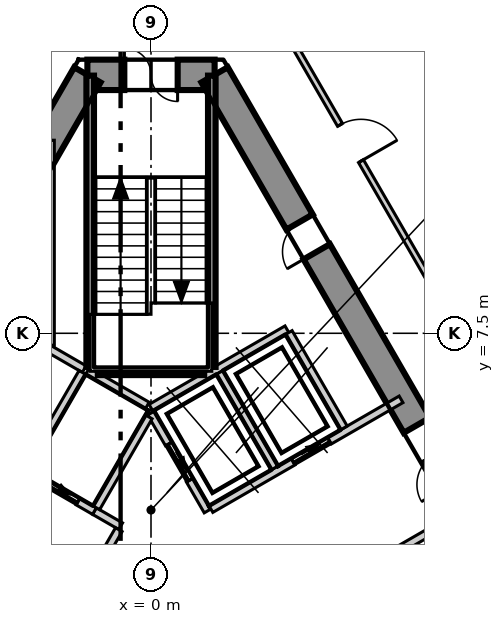
"""IFC4 building model, lengths in metres.
Left out: names, types, materials, properties, quantities, classifications, styles, units other than length and angle.
Written with IfcOpenShell. Run it as: python <this file> out.ifc"""

import sys

from ifc_helpers import new_model, si_unit, direction, frame, frame_2d, origin, place, context, subcontext, project, spatial, polyline, rectangle, outline, extrude, element, fill, save


model = new_model("IFC4")
c1 = context("Model", 3, precision=1e-05, world=origin(), true_north=direction((0.0, 1.0)))
c2 = subcontext(c1, "Body", "Model", "MODEL_VIEW")
j1 = project(units=[si_unit("LENGTHUNIT", "METRE"), si_unit("PLANEANGLEUNIT", "RADIAN")], contexts=[c1])
p1 = place(None, origin())
s1 = spatial("IfcSite", under=j1, at=p1, CompositionType="ELEMENT")
p2 = place(p1, origin())
s2 = spatial("IfcBuilding", under=s1, at=p2, CompositionType="ELEMENT")
p3 = place(p2, frame((0.0, 0.0, 128.3)))
s3 = spatial("IfcBuildingStorey", under=s2, at=p3, CompositionType="ELEMENT", Elevation=128.3)
p4 = place(p3, frame((1.674, 14.3, -0.3), z_axis=(0.0, 0.0, 1.0), x_axis=(-1.0, 0.0, 0.0)))
e1 = element("IfcWall", 1, at=p4, inside=s3, PredefinedType="SHEAR", context=c2, shape_type="SweptSolid", body=[
    extrude(outline(polyline([(-0.231, -0.4), (1.674, -0.4), (3.579, -0.4), (3.117, 0.4), (1.674, 0.4), (0.231, 0.4), (-0.231, -0.4)])), origin(), (0.0, 0.0, 1.0), 4.0),
])
p5 = place(p4, frame((0.974, 0.0, 0.3)))
e2 = element("IfcOpeningElement", 2, at=p5, cuts=e1, PredefinedType="OPENING", context=c2, shape_type="SweptSolid", body=[
    extrude(rectangle(XDim=1.4, YDim=2.1, at=frame_2d((0.7, 1.05))), frame((0.0, 0.41, 0.0), z_axis=(0.0, -1.0, 0.0), x_axis=(1.0, 0.0, 0.0)), (0.0, 0.0, 1.0), 0.82),
])
p6 = place(p3, frame((-1.674, 14.3, -0.3), z_axis=(0.0, 0.0, 1.0), x_axis=(-0.499995765644, -0.866027848477, 0.0)))
e3 = element("IfcWall", 3, at=p6, inside=s3, PredefinedType="SHEAR", context=c2, shape_type="SweptSolid", body=[
    extrude(outline(polyline([(-0.231, -0.4), (1.732, -0.4), (3.695, -0.4), (5.658, -0.4), (7.621, -0.4), (9.584, -0.4), (11.547, -0.4), (13.51, -0.4), (15.473, -0.4), (17.436, -0.4), (19.399, -0.4), (21.362, -0.4), (23.325, -0.4), (22.863, 0.4), (20.977, 0.4), (19.091, 0.4), (17.205, 0.4), (15.319, 0.4), (13.433, 0.4), (11.547, 0.4), (9.661, 0.4), (7.775, 0.4), (5.889, 0.4), (4.003, 0.4), (2.117, 0.4), (0.231, 0.4), (-0.231, -0.4)])), origin(), (0.0, 0.0, 1.0), 4.0),
])
p7 = place(p6, frame((10.997, 0.0, 0.3)))
e4 = element("IfcOpeningElement", 4, at=p7, cuts=e3, PredefinedType="OPENING", context=c2, shape_type="SweptSolid", body=[
    extrude(rectangle(XDim=1.1, YDim=2.1, at=frame_2d((0.55, 1.05))), frame((0.0, 0.41, 0.0), z_axis=(0.0, -1.0, 0.0), x_axis=(1.0, 0.0, 0.0)), (0.0, 0.0, 1.0), 0.82),
])
p8 = place(p6, frame((5.444, 0.0, 0.3)))
e5 = element("IfcOpeningElement", 5, at=p8, cuts=e3, PredefinedType="OPENING", context=c2, shape_type="SweptSolid", body=[
    extrude(rectangle(XDim=0.9, YDim=2.1, at=frame_2d((0.45, 1.05))), frame((0.0, 0.41, 0.0), z_axis=(0.0, -1.0, 0.0), x_axis=(1.0, 0.0, 0.0)), (0.0, 0.0, 1.0), 0.82),
])
p9 = place(p3, frame((13.221, -5.7, -0.3), z_axis=(0.0, 0.0, 1.0), x_axis=(-0.499995765644, 0.866027848477, 0.0)))
e6 = element("IfcWall", 6, at=p9, inside=s3, PredefinedType="SHEAR", context=c2, shape_type="SweptSolid", body=[
    extrude(outline(polyline([(-0.231, -0.4), (1.732, -0.4), (3.695, -0.4), (5.658, -0.4), (7.621, -0.4), (9.584, -0.4), (11.547, -0.4), (13.51, -0.4), (15.473, -0.4), (17.436, -0.4), (19.399, -0.4), (21.362, -0.4), (23.325, -0.4), (22.863, 0.4), (20.977, 0.4), (19.091, 0.4), (17.205, 0.4), (15.319, 0.4), (13.433, 0.4), (11.547, 0.4), (9.661, 0.4), (7.775, 0.4), (5.889, 0.4), (4.003, 0.4), (2.117, 0.4), (0.231, 0.4), (-0.231, -0.4)])), origin(), (0.0, 0.0, 1.0), 4.0),
])
p10 = place(p9, frame((10.647, 0.0, 0.3)))
e7 = element("IfcOpeningElement", 7, at=p10, cuts=e6, PredefinedType="OPENING", context=c2, shape_type="SweptSolid", body=[
    extrude(rectangle(XDim=1.8, YDim=2.1, at=frame_2d((0.9, 1.05))), frame((0.0, 0.41, 0.0), z_axis=(0.0, -1.0, 0.0), x_axis=(1.0, 0.0, 0.0)), (0.0, 0.0, 1.0), 0.82),
])
p11 = place(p9, frame((17.721, 0.0, 0.3)))
e8 = element("IfcOpeningElement", 8, at=p11, cuts=e6, PredefinedType="OPENING", context=c2, shape_type="SweptSolid", body=[
    extrude(rectangle(XDim=0.9, YDim=2.1, at=frame_2d((0.45, 1.05))), frame((0.0, 0.41, 0.0), z_axis=(0.0, -1.0, 0.0), x_axis=(1.0, 0.0, 0.0)), (0.0, 0.0, 1.0), 0.82),
])
p12 = place(p3, frame((31.588, -14.647, 0.0), z_axis=(0.0, 0.0, 1.0), x_axis=(-0.500005036527, 0.866022495925, 0.0)))
e9 = element("IfcWall", 9, at=p12, inside=s3, PredefinedType="ELEMENTEDWALL", context=c2, shape_type="SweptSolid", body=[
    extrude(rectangle(XDim=56.938, YDim=0.2, at=frame_2d((28.469, 0.0))), origin(), (0.0, 0.0, 1.0), 3.7),
])
p13 = place(p12, frame((2.25, 0.0, 0.9)))
e10 = element("IfcOpeningElement", 10, at=p13, cuts=e9, PredefinedType="OPENING", context=c2, shape_type="SweptSolid", body=[
    extrude(rectangle(XDim=4.9, YDim=2.5, at=frame_2d((2.45, 1.25))), frame((0.0, 0.11, 0.0), z_axis=(0.0, -1.0, 0.0), x_axis=(1.0, 0.0, 0.0)), (0.0, 0.0, 1.0), 0.22),
])
p14 = place(p12, frame((9.044, 0.0, 0.9)))
e11 = element("IfcOpeningElement", 11, at=p14, cuts=e9, PredefinedType="OPENING", context=c2, shape_type="SweptSolid", body=[
    extrude(rectangle(XDim=4.9, YDim=2.5, at=frame_2d((2.45, 1.25))), frame((0.0, 0.11, 0.0), z_axis=(0.0, -1.0, 0.0), x_axis=(1.0, 0.0, 0.0)), (0.0, 0.0, 1.0), 0.22),
])
p15 = place(p12, frame((15.838, 0.0, 0.9)))
e12 = element("IfcOpeningElement", 12, at=p15, cuts=e9, PredefinedType="OPENING", context=c2, shape_type="SweptSolid", body=[
    extrude(rectangle(XDim=4.9, YDim=2.5, at=frame_2d((2.45, 1.25))), frame((0.0, 0.11, 0.0), z_axis=(0.0, -1.0, 0.0), x_axis=(1.0, 0.0, 0.0)), (0.0, 0.0, 1.0), 0.22),
])
p16 = place(p12, frame((22.632, 0.0, 0.9)))
e13 = element("IfcOpeningElement", 13, at=p16, cuts=e9, PredefinedType="OPENING", context=c2, shape_type="SweptSolid", body=[
    extrude(rectangle(XDim=4.9, YDim=2.5, at=frame_2d((2.45, 1.25))), frame((0.0, 0.11, 0.0), z_axis=(0.0, -1.0, 0.0), x_axis=(1.0, 0.0, 0.0)), (0.0, 0.0, 1.0), 0.22),
])
p17 = place(p12, frame((29.426, 0.0, 0.9)))
e14 = element("IfcOpeningElement", 14, at=p17, cuts=e9, PredefinedType="OPENING", context=c2, shape_type="SweptSolid", body=[
    extrude(rectangle(XDim=4.9, YDim=2.5, at=frame_2d((2.45, 1.25))), frame((0.0, 0.11, 0.0), z_axis=(0.0, -1.0, 0.0), x_axis=(1.0, 0.0, 0.0)), (0.0, 0.0, 1.0), 0.22),
])
p18 = place(p12, frame((36.22, 0.0, 0.9)))
e15 = element("IfcOpeningElement", 15, at=p18, cuts=e9, PredefinedType="OPENING", context=c2, shape_type="SweptSolid", body=[
    extrude(rectangle(XDim=4.9, YDim=2.5, at=frame_2d((2.45, 1.25))), frame((0.0, 0.11, 0.0), z_axis=(0.0, -1.0, 0.0), x_axis=(1.0, 0.0, 0.0)), (0.0, 0.0, 1.0), 0.22),
])
p19 = place(p12, frame((43.014, 0.0, 0.9)))
e16 = element("IfcOpeningElement", 16, at=p19, cuts=e9, PredefinedType="OPENING", context=c2, shape_type="SweptSolid", body=[
    extrude(rectangle(XDim=4.9, YDim=2.5, at=frame_2d((2.45, 1.25))), frame((0.0, 0.11, 0.0), z_axis=(0.0, -1.0, 0.0), x_axis=(1.0, 0.0, 0.0)), (0.0, 0.0, 1.0), 0.22),
])
p20 = place(p12, frame((49.808, 0.0, 0.9)))
e17 = element("IfcOpeningElement", 17, at=p20, cuts=e9, PredefinedType="OPENING", context=c2, shape_type="SweptSolid", body=[
    extrude(rectangle(XDim=4.9, YDim=2.5, at=frame_2d((2.45, 1.25))), frame((0.0, 0.11, 0.0), z_axis=(0.0, -1.0, 0.0), x_axis=(1.0, 0.0, 0.0)), (0.0, 0.0, 1.0), 0.22),
])
p21 = place(p3, frame((-8.903, 6.18, 0.0), z_axis=(0.0, 0.0, 1.0), x_axis=(0.500010074151, 0.866019587393, 0.0)))
e18 = element("IfcWall", 18, at=p21, inside=s3, PredefinedType="PARTITIONING", context=c2, shape_type="SweptSolid", body=[
    extrude(rectangle(XDim=17.806, YDim=0.15, at=frame_2d((8.903, 0.0))), origin(), (0.0, 0.0, 1.0), 3.7),
])
p22 = place(p21, frame((14.756, 0.0, 0.0)))
e19 = element("IfcOpeningElement", 19, at=p22, cuts=e18, PredefinedType="OPENING", context=c2, shape_type="SweptSolid", body=[
    extrude(rectangle(XDim=1.0, YDim=2.1, at=frame_2d((0.5, 1.05))), frame((0.0, 0.085, 0.0), z_axis=(0.0, -1.0, 0.0), x_axis=(1.0, 0.0, 0.0)), (0.0, 0.0, 1.0), 0.17),
])
p23 = place(p21, frame((2.838, 0.0, 0.0)))
e20 = element("IfcOpeningElement", 20, at=p23, cuts=e18, PredefinedType="OPENING", context=c2, shape_type="SweptSolid", body=[
    extrude(rectangle(XDim=1.1, YDim=2.1, at=frame_2d((0.55, 1.05))), frame((0.0, 0.085, 0.0), z_axis=(0.0, -1.0, 0.0), x_axis=(1.0, 0.0, 0.0)), (0.0, 0.0, 1.0), 0.17),
])
p24 = place(p21, frame((10.438, 0.0, 0.0)))
e21 = element("IfcOpeningElement", 21, at=p24, cuts=e18, PredefinedType="OPENING", context=c2, shape_type="SweptSolid", body=[
    extrude(rectangle(XDim=0.9, YDim=2.1, at=frame_2d((0.45, 1.05))), frame((0.0, 0.085, 0.0), z_axis=(0.0, -1.0, 0.0), x_axis=(1.0, 0.0, 0.0)), (0.0, 0.0, 1.0), 0.17),
])
p25 = place(p21, frame((7.438, 0.0, 0.0)))
e22 = element("IfcOpeningElement", 22, at=p25, cuts=e18, PredefinedType="OPENING", context=c2, shape_type="SweptSolid", body=[
    extrude(rectangle(XDim=0.9, YDim=2.1, at=frame_2d((0.45, 1.05))), frame((0.0, 0.085, 0.0), z_axis=(0.0, -1.0, 0.0), x_axis=(1.0, 0.0, 0.0)), (0.0, 0.0, 1.0), 0.17),
])
p26 = place(p3, frame((0.076, 21.468, 0.0), z_axis=(0.0, 0.0, 1.0), x_axis=(0.50001203818, -0.866018453426, 0.0)))
e23 = element("IfcWall", 23, at=p26, inside=s3, PredefinedType="PARTITIONING", context=c2, shape_type="SweptSolid", body=[
    extrude(rectangle(XDim=24.448, YDim=0.15, at=frame_2d((12.224, 0.0))), origin(), (0.0, 0.0, 1.0), 3.7),
])
p27 = place(p26, frame((9.798, 0.0, 0.0)))
e24 = element("IfcOpeningElement", 24, at=p27, cuts=e23, PredefinedType="OPENING", context=c2, shape_type="SweptSolid", body=[
    extrude(rectangle(XDim=1.1, YDim=2.1, at=frame_2d((0.55, 1.05))), frame((0.0, 0.085, 0.0), z_axis=(0.0, -1.0, 0.0), x_axis=(1.0, 0.0, 0.0)), (0.0, 0.0, 1.0), 0.17),
])
p28 = place(p26, frame((19.198, 0.0, 0.0)))
e25 = element("IfcOpeningElement", 25, at=p28, cuts=e23, PredefinedType="OPENING", context=c2, shape_type="SweptSolid", body=[
    extrude(rectangle(XDim=0.9, YDim=2.1, at=frame_2d((0.45, 1.05))), frame((0.0, 0.085, 0.0), z_axis=(0.0, -1.0, 0.0), x_axis=(1.0, 0.0, 0.0)), (0.0, 0.0, 1.0), 0.17),
])
p29 = place(p26, frame((16.398, 0.0, 0.0)))
e26 = element("IfcOpeningElement", 26, at=p29, cuts=e23, PredefinedType="OPENING", context=c2, shape_type="SweptSolid", body=[
    extrude(rectangle(XDim=1.0, YDim=2.1, at=frame_2d((0.5, 1.05))), frame((0.0, 0.085, 0.0), z_axis=(0.0, -1.0, 0.0), x_axis=(1.0, 0.0, 0.0)), (0.0, 0.0, 1.0), 0.17),
])
p30 = place(p26, frame((1.815, 0.0, 0.0)))
e27 = element("IfcOpeningElement", 27, at=p30, cuts=e23, PredefinedType="OPENING", context=c2, shape_type="SweptSolid", body=[
    extrude(rectangle(XDim=1.1, YDim=2.1, at=frame_2d((0.55, 1.05))), frame((0.0, 0.085, 0.0), z_axis=(0.0, -1.0, 0.0), x_axis=(1.0, 0.0, 0.0)), (0.0, 0.0, 1.0), 0.17),
])
p31 = place(p3, frame((-0.002, 5.542, 0.0), z_axis=(0.0, 0.0, 1.0), x_axis=(0.866103910842, 0.499863997127, 0.0)))
e28 = element("IfcWall", 28, at=p31, inside=s3, PredefinedType="SOLIDWALL", context=c2, shape_type="SweptSolid", body=[
    extrude(rectangle(XDim=4.131, YDim=0.2, at=frame_2d((2.065, 0.0))), origin(), (0.0, 0.0, 1.0), 3.7),
])
p32 = place(p3, frame((0.0, 5.4, 0.0), z_axis=(0.0, 0.0, 1.0), x_axis=(0.500103862429, -0.865965430478, 0.0)))
e29 = element("IfcWall", 29, at=p32, inside=s3, PredefinedType="SOLIDWALL", context=c2, shape_type="SweptSolid", body=[
    extrude(rectangle(XDim=2.973, YDim=0.2, at=frame_2d((1.487, 0.0))), origin(), (0.0, 0.0, 1.0), 3.7),
])
p33 = place(p32, frame((0.937, 0.0, 0.0)))
e30 = element("IfcOpeningElement", 30, at=p33, cuts=e29, PredefinedType="OPENING", context=c2, shape_type="SweptSolid", body=[
    extrude(rectangle(XDim=1.1, YDim=2.1, at=frame_2d((0.55, 1.05))), frame((0.0, 0.11, 0.0), z_axis=(0.0, -1.0, 0.0), x_axis=(1.0, 0.0, 0.0)), (0.0, 0.0, 1.0), 0.22),
])
p34 = place(p3, frame((1.577, 2.874, 0.0), z_axis=(0.0, 0.0, 1.0), x_axis=(0.866073694534, 0.499916348638, 0.0)))
e31 = element("IfcWall", 31, at=p34, inside=s3, PredefinedType="SOLIDWALL", context=c2, shape_type="SweptSolid", body=[
    extrude(rectangle(XDim=5.777, YDim=0.2, at=frame_2d((2.888, 0.0))), origin(), (0.0, 0.0, 1.0), 3.7),
])
p35 = place(p34, frame((2.497, 0.0, 0.0)))
e32 = element("IfcOpeningElement", 32, at=p35, cuts=e31, PredefinedType="OPENING", context=c2, shape_type="SweptSolid", body=[
    extrude(rectangle(XDim=1.1, YDim=2.1, at=frame_2d((0.55, 1.05))), frame((0.0, 0.11, 0.0), z_axis=(0.0, -1.0, 0.0), x_axis=(1.0, 0.0, 0.0)), (0.0, 0.0, 1.0), 0.22),
])
for number, where, z_axis, x_axis in (
    (33, (3.626, 7.52, 0.0), (0.0, 0.0, 1.0), (0.5, -0.866, 0.0)),
    (34, (1.807, 6.47, 0.0), (0.0, 0.0, 1.0), (0.5, -0.866, 0.0)),
):
    element("IfcWall", number, at=place(p3, frame(where, z_axis=z_axis, x_axis=x_axis)), inside=s3, PredefinedType="SOLIDWALL", context=c2, shape_type="SweptSolid", body=[
        extrude(rectangle(XDim=2.9, YDim=0.2, at=frame_2d((1.45, 0.0))), origin(), (0.0, 0.0, 1.0), 3.7),
    ])
p36 = place(p3, frame((3.278, -0.071, 0.0), z_axis=(0.0, 0.0, 1.0), x_axis=(0.865929348003, 0.5001663366, 0.0)))
e35 = element("IfcWall", 35, at=p36, inside=s3, PredefinedType="SOLIDWALL", context=c2, shape_type="SweptSolid", body=[
    extrude(rectangle(XDim=5.776, YDim=0.2, at=frame_2d((2.888, 0.0))), origin(), (0.0, 0.0, 1.0), 3.7),
])
p37 = place(p3, frame((-1.488, 2.822, 0.0), z_axis=(0.0, 0.0, 1.0), x_axis=(0.866236612152, -0.499633997809, 0.0)))
e36 = element("IfcWall", 36, at=p37, inside=s3, PredefinedType="SOLIDWALL", context=c2, shape_type="SweptSolid", body=[
    extrude(rectangle(XDim=0.796, YDim=0.2, at=frame_2d((0.398, 0.0))), origin(), (0.0, 0.0, 1.0), 3.7),
])
p38 = place(p3, frame((-3.489, 7.557, 0.0), z_axis=(0.0, 0.0, 1.0), x_axis=(0.866010750942, -0.50002537861, 0.0)))
e37 = element("IfcWall", 37, at=p38, inside=s3, PredefinedType="SOLIDWALL", context=c2, shape_type="SweptSolid", body=[
    extrude(rectangle(XDim=2.0, YDim=0.2, at=frame_2d((1.0, 0.0))), origin(), (0.0, 0.0, 1.0), 3.7),
])
p39 = place(p3, frame((-2.444, -0.433, 0.0), z_axis=(0.0, 0.0, 1.0), x_axis=(0.500035624827, 0.866004834804, 0.0)))
e38 = element("IfcWall", 38, at=p39, inside=s3, PredefinedType="SOLIDWALL", context=c2, shape_type="SweptSolid", body=[
    extrude(rectangle(XDim=3.194, YDim=0.2, at=frame_2d((1.597, 0.0))), origin(), (0.0, 0.0, 1.0), 3.7),
])
p40 = place(p3, frame((-3.309, 3.873, 0.0), z_axis=(0.0, 0.0, 1.0), x_axis=(0.866098583652, -0.499873227325, 0.0)))
e39 = element("IfcWall", 39, at=p40, inside=s3, PredefinedType="SOLIDWALL", context=c2, shape_type="SweptSolid", body=[
    extrude(rectangle(XDim=2.103, YDim=0.2, at=frame_2d((1.051, 0.0))), origin(), (0.0, 0.0, 1.0), 3.7),
])
p41 = place(p40, frame((0.502, 0.0, 0.0)))
e40 = element("IfcOpeningElement", 40, at=p41, cuts=e39, PredefinedType="OPENING", context=c2, shape_type="SweptSolid", body=[
    extrude(rectangle(XDim=1.1, YDim=2.1, at=frame_2d((0.55, 1.05))), frame((0.0, 0.11, 0.0), z_axis=(0.0, -1.0, 0.0), x_axis=(1.0, 0.0, 0.0)), (0.0, 0.0, 1.0), 0.22),
])
p42 = place(p3, frame((-3.257, 3.959, 0.0), z_axis=(0.0, 0.0, 1.0), x_axis=(0.50012328804, 0.865954211699, 0.0)))
e41 = element("IfcWall", 41, at=p42, inside=s3, PredefinedType="SOLIDWALL", context=c2, shape_type="SweptSolid", body=[
    extrude(rectangle(XDim=2.9, YDim=0.2, at=frame_2d((1.45, 0.0))), origin(), (0.0, 0.0, 1.0), 3.7),
])
p43 = place(p3, frame((-1.67, 6.507, 0.0), z_axis=(0.0, 0.0, 1.0), x_axis=(0.865941441609, -0.500145398563, 0.0)))
e42 = element("IfcWall", 42, at=p43, inside=s3, PredefinedType="SOLIDWALL", context=c2, shape_type="SweptSolid", body=[
    extrude(rectangle(XDim=1.815, YDim=0.2, at=frame_2d((0.908, 0.0))), origin(), (0.0, 0.0, 1.0), 3.7),
])
p44 = place(p3, frame((-1.438, 2.909, 0.0), z_axis=(0.0, 0.0, 1.0), x_axis=(0.499829630636, 0.866123744241, 0.0)))
e43 = element("IfcWall", 43, at=p44, inside=s3, PredefinedType="SOLIDWALL", context=c2, shape_type="SweptSolid", body=[
    extrude(rectangle(XDim=2.761, YDim=0.2, at=frame_2d((1.38, 0.0))), origin(), (0.0, 0.0, 1.0), 3.7),
])
p45 = place(p3, frame((-2.644, 7.185, 0.0), z_axis=(0.0, 0.0, 1.0), x_axis=(0.0, 1.0, 0.0)))
e44 = element("IfcWall", 44, at=p45, inside=s3, PredefinedType="SOLIDWALL", context=c2, shape_type="SweptSolid", body=[
    extrude(rectangle(XDim=5.395, YDim=0.2, at=frame_2d((2.698, 0.0))), origin(), (0.0, 0.0, 1.0), 3.7),
])
p46 = place(p3, frame((1.6, 6.615, 0.0), z_axis=(0.0, 0.0, 1.0), x_axis=(0.0, 1.0, 0.0)))
e45 = element("IfcWall", 45, at=p46, inside=s3, PredefinedType="SOLIDWALL", context=c2, shape_type="SweptSolid", body=[
    extrude(rectangle(XDim=7.665, YDim=0.2, at=frame_2d((3.833, 0.0))), origin(), (0.0, 0.0, 1.0), 3.7),
])
p47 = place(p3, frame((-1.4, 6.5, 0.0), z_axis=(0.0, 0.0, 1.0), x_axis=(1.0, 0.0, 0.0)))
e46 = element("IfcWall", 46, at=p47, inside=s3, PredefinedType="SOLIDWALL", context=c2, shape_type="SweptSolid", body=[
    extrude(rectangle(XDim=2.8, YDim=0.2, at=frame_2d((1.4, 0.0))), origin(), (0.0, 0.0, 1.0), 3.7),
])
p48 = place(p3, frame((-1.6, 6.615, 0.0), z_axis=(0.0, 0.0, 1.0), x_axis=(0.0, 1.0, 0.0)))
e47 = element("IfcWall", 47, at=p48, inside=s3, PredefinedType="SOLIDWALL", context=c2, shape_type="SweptSolid", body=[
    extrude(rectangle(XDim=7.665, YDim=0.2, at=frame_2d((3.833, 0.0))), origin(), (0.0, 0.0, 1.0), 3.7),
])
p49 = place(p33, origin())
e48 = element("IfcDoor", 48, at=p49, inside=s3, OperationType="SLIDING_TO_LEFT", PredefinedType="DOOR", context=c2, shape_type="SweptSolid", body=[
    extrude(rectangle(XDim=1.1, YDim=2.1, at=frame_2d((0.55, 1.05))), frame((0.0, 0.025, 0.0), z_axis=(0.0, -1.0, 0.0), x_axis=(1.0, 0.0, 0.0)), (0.0, 0.0, 1.0), 0.05),
])
fill(e30, e48)
p50 = place(p35, origin())
e49 = element("IfcDoor", 49, at=p50, inside=s3, OperationType="SLIDING_TO_LEFT", PredefinedType="DOOR", context=c2, shape_type="SweptSolid", body=[
    extrude(rectangle(XDim=1.1, YDim=2.1, at=frame_2d((0.55, 1.05))), frame((0.0, 0.025, 0.0), z_axis=(0.0, -1.0, 0.0), x_axis=(1.0, 0.0, 0.0)), (0.0, 0.0, 1.0), 0.05),
])
fill(e32, e49)
p51 = place(p41, origin())
e50 = element("IfcDoor", 50, at=p51, inside=s3, OperationType="SLIDING_TO_LEFT", PredefinedType="DOOR", context=c2, shape_type="SweptSolid", body=[
    extrude(rectangle(XDim=1.1, YDim=2.1, at=frame_2d((0.55, 1.05))), frame((0.0, 0.025, 0.0), z_axis=(0.0, -1.0, 0.0), x_axis=(1.0, 0.0, 0.0)), (0.0, 0.0, 1.0), 0.05),
])
fill(e40, e50)
p52 = place(p27, origin())
e51 = element("IfcDoor", 51, at=p52, inside=s3, OperationType="SINGLE_SWING_LEFT", PredefinedType="DOOR", context=c2, shape_type="SweptSolid", body=[
    extrude(rectangle(XDim=1.1, YDim=2.1, at=frame_2d((0.55, 1.05))), frame((0.0, 0.025, 0.0), z_axis=(0.0, -1.0, 0.0), x_axis=(1.0, 0.0, 0.0)), (0.0, 0.0, 1.0), 0.05),
])
fill(e24, e51)
p53 = place(p10, origin())
e52 = element("IfcDoor", 52, at=p53, inside=s3, OperationType="DOUBLE_DOOR_SINGLE_SWING", PredefinedType="DOOR", context=c2, shape_type="SweptSolid", body=[
    extrude(rectangle(XDim=1.8, YDim=2.1, at=frame_2d((0.9, 1.05))), frame((0.0, 0.025, 0.0), z_axis=(0.0, -1.0, 0.0), x_axis=(1.0, 0.0, 0.0)), (0.0, 0.0, 1.0), 0.05),
])
fill(e7, e52)
p54 = place(p5, origin())
e53 = element("IfcDoor", 53, at=p54, inside=s3, OperationType="DOUBLE_DOOR_SINGLE_SWING", PredefinedType="DOOR", context=c2, shape_type="SweptSolid", body=[
    extrude(rectangle(XDim=1.4, YDim=2.1, at=frame_2d((0.7, 1.05))), frame((0.0, 0.025, 0.0), z_axis=(0.0, -1.0, 0.0), x_axis=(1.0, 0.0, 0.0)), (0.0, 0.0, 1.0), 0.05),
])
fill(e2, e53)
p55 = place(p11, origin())
e54 = element("IfcDoor", 54, at=p55, inside=s3, OperationType="SINGLE_SWING_RIGHT", PredefinedType="DOOR", context=c2, shape_type="SweptSolid", body=[
    extrude(rectangle(XDim=0.9, YDim=2.1, at=frame_2d((0.45, 1.05))), frame((0.0, 0.025, 0.0), z_axis=(0.0, -1.0, 0.0), x_axis=(1.0, 0.0, 0.0)), (0.0, 0.0, 1.0), 0.05),
])
fill(e8, e54)
save(model, sys.argv[1])
